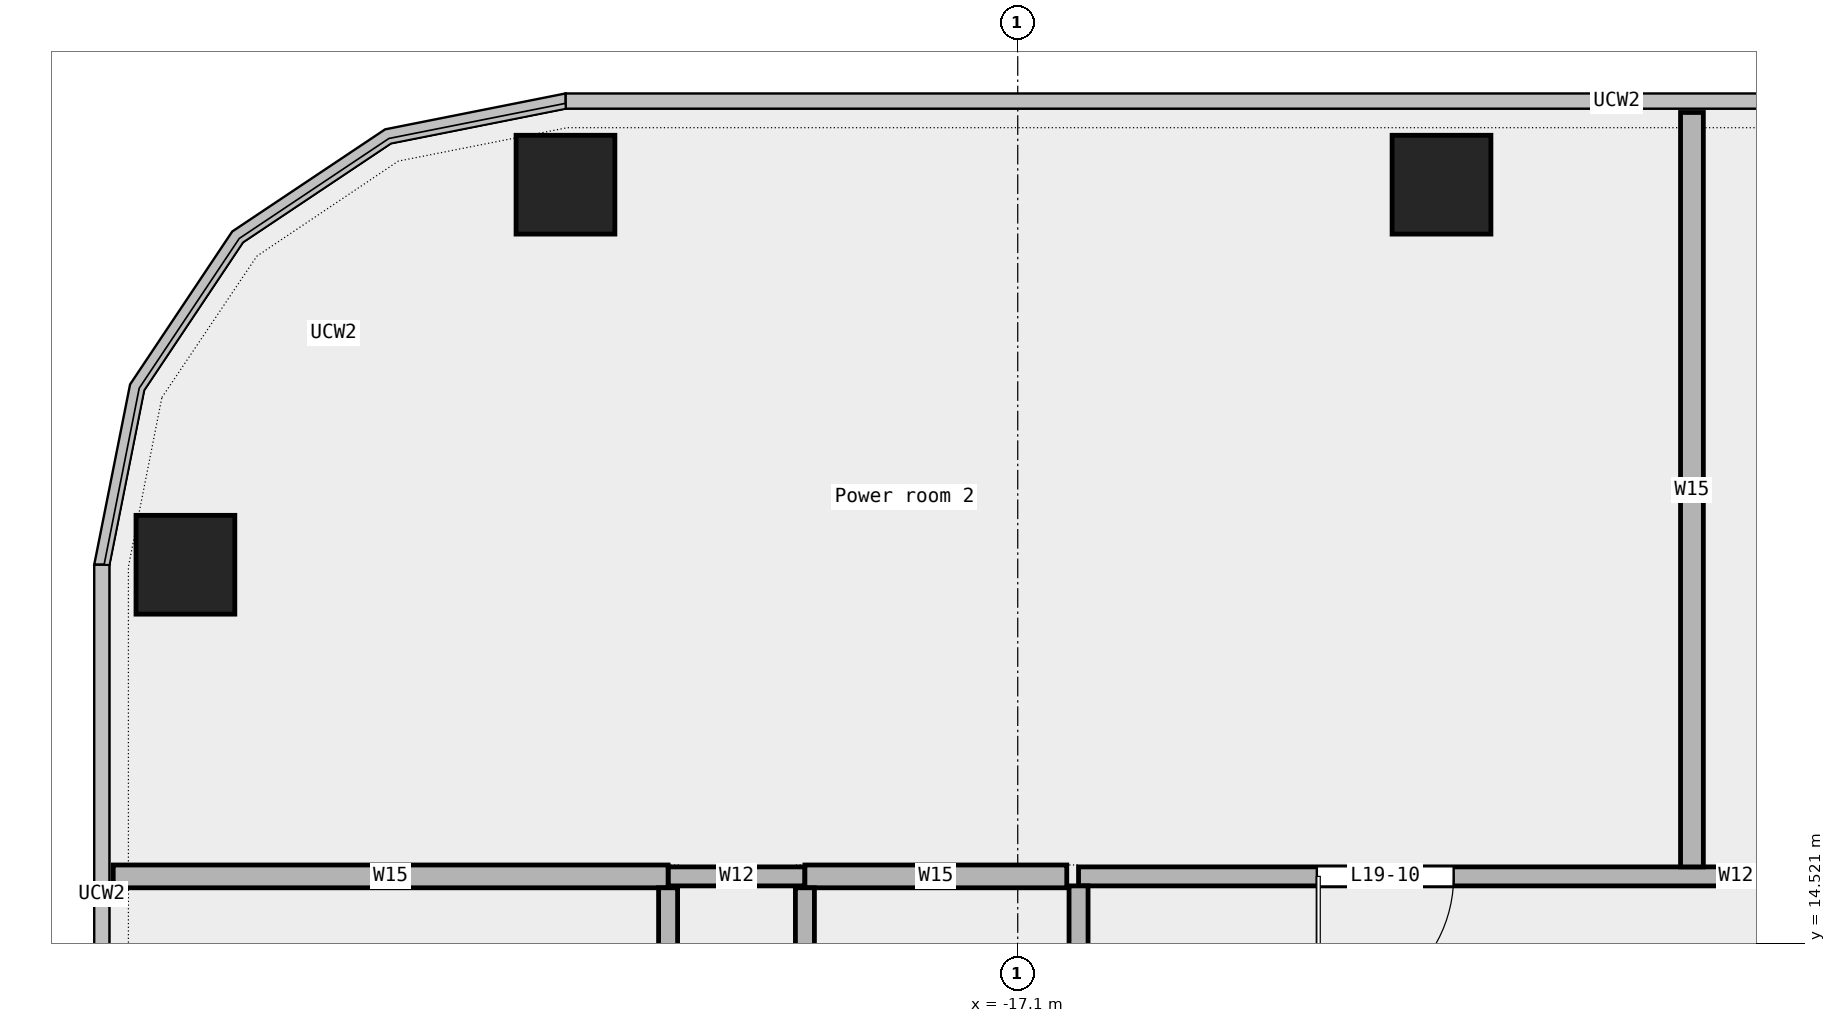
"""IFC4 building model, lengths in metres.
Left out: names, types, materials, properties, quantities, classifications, styles, units other than length and angle.
Written with IfcOpenShell. Run it as: python <this file> out.ifc"""

import sys

from ifc_helpers import new_model, si_unit, direction, frame, frame_2d, origin, origin_2d, place, context, subcontext, project, spatial, rectangle, extrude, element, fill, save


model = new_model("IFC4")
c1 = context("Model", 3, precision=1e-05, world=origin(), true_north=direction((0.0, 1.0)))
c2 = subcontext(c1, "Body", "Model", "MODEL_VIEW")
j1 = project(units=[si_unit("LENGTHUNIT", "METRE"), si_unit("PLANEANGLEUNIT", "RADIAN")], contexts=[c1])
p1 = place(None, origin())
s1 = spatial("IfcSite", under=j1, at=p1, CompositionType="ELEMENT")
p2 = place(p1, origin())
s2 = spatial("IfcBuilding", under=s1, at=p2, CompositionType="ELEMENT")
p3 = place(p2, frame((0.0, 0.0, 99.1)))
s3 = spatial("IfcBuildingStorey", under=s2, at=p3, CompositionType="ELEMENT", Elevation=99.1)
for number, where, z_axis, x_axis in (
    (1, (-11.525, 24.5, 0.0), (0.0, 0.0, 1.0), (1.0, 0.0, 0.0)),
    (2, (-23.05, 24.5, 0.0), (0.0, 0.0, 1.0), (1.0, 0.0, 0.0)),
    (3, (-28.05, 19.5, 0.0), (0.0, 0.0, 1.0), (1.0, 0.0, 0.0)),
):
    element("IfcColumn", number, at=place(p3, frame(where, z_axis=z_axis, x_axis=x_axis)), inside=s3, PredefinedType="COLUMN", context=c2, shape_type="SweptSolid", body=[
        extrude(rectangle(XDim=1.3, YDim=1.3, at=origin_2d()), origin(), (0.0, 0.0, 1.0), 4.05),
    ])
p4 = place(p3, frame((-21.7, 15.4, 0.0), z_axis=(0.0, 0.0, 1.0), x_axis=(1.0, 0.0, 0.0)))
e4 = element("IfcWall", 4, at=p4, inside=s3, PredefinedType="PARTITIONING", context=c2, shape_type="SweptSolid", body=[
    extrude(rectangle(XDim=1.8, YDim=0.25, at=frame_2d((0.9, 0.0))), origin(), (0.0, 0.0, 1.0), 4.05),
])
p5 = place(p3, frame((-16.3, 15.4, 0.0), z_axis=(0.0, 0.0, 1.0), x_axis=(1.0, 0.0, 0.0)))
e5 = element("IfcWall", 5, at=p5, inside=s3, PredefinedType="PARTITIONING", context=c2, shape_type="SweptSolid", body=[
    extrude(rectangle(XDim=17.3, YDim=0.25, at=frame_2d((8.65, 0.0))), origin(), (0.0, 0.0, 1.0), 4.05),
])
p6 = place(p5, frame((12.085, 0.0, 0.0)))
e6 = element("IfcOpeningElement", 6, at=p6, cuts=e5, PredefinedType="OPENING", context=c2, shape_type="SweptSolid", body=[
    extrude(rectangle(XDim=1.2, YDim=2.1, at=frame_2d((0.6, 1.05))), frame((0.0, 0.137, 0.0), z_axis=(0.0, -1.0, 0.0), x_axis=(1.0, 0.0, 0.0)), (0.0, 0.0, 1.0), 0.274),
])
p7 = place(p5, frame((3.135, 0.0, 0.0)))
e7 = element("IfcOpeningElement", 7, at=p7, cuts=e5, PredefinedType="OPENING", context=c2, shape_type="SweptSolid", body=[
    extrude(rectangle(XDim=1.8, YDim=2.1, at=frame_2d((0.9, 1.05))), frame((0.0, 0.137, 0.0), z_axis=(0.0, -1.0, 0.0), x_axis=(1.0, 0.0, 0.0)), (0.0, 0.0, 1.0), 0.274),
])
p8 = place(p3, frame((-29.0, 15.4, 0.0), z_axis=(0.0, 0.0, 1.0), x_axis=(1.0, 0.0, 0.0)))
e8 = element("IfcWall", 8, at=p8, inside=s3, PredefinedType="PARTITIONING", context=c2, shape_type="SweptSolid", body=[
    extrude(rectangle(XDim=7.3, YDim=0.3, at=frame_2d((3.65, 0.0))), origin(), (0.0, 0.0, 1.0), 4.05),
])
p9 = place(p3, frame((-19.9, 15.4, 0.0), z_axis=(0.0, 0.0, 1.0), x_axis=(1.0, 0.0, 0.0)))
e9 = element("IfcWall", 9, at=p9, inside=s3, PredefinedType="PARTITIONING", context=c2, shape_type="SweptSolid", body=[
    extrude(rectangle(XDim=3.445, YDim=0.3, at=frame_2d((1.722, 0.0))), origin(), (0.0, 0.0, 1.0), 4.05),
])
p10 = place(p3, frame((-21.7, 10.96, 0.0), z_axis=(0.0, 0.0, 1.0), x_axis=(0.0, 1.0, 0.0)))
e10 = element("IfcWall", 10, at=p10, inside=s3, PredefinedType="PARTITIONING", context=c2, shape_type="SweptSolid", body=[
    extrude(rectangle(XDim=4.29, YDim=0.25, at=frame_2d((2.145, 0.0))), origin(), (0.0, 0.0, 1.0), 4.05),
])
p11 = place(p10, frame((1.545, 0.0, 0.0)))
e11 = element("IfcOpeningElement", 11, at=p11, cuts=e10, PredefinedType="OPENING", context=c2, shape_type="SweptSolid", body=[
    extrude(rectangle(XDim=1.2, YDim=2.1, at=frame_2d((0.6, 1.05))), frame((0.0, 0.137, 0.0), z_axis=(0.0, -1.0, 0.0), x_axis=(1.0, 0.0, 0.0)), (0.0, 0.0, 1.0), 0.274),
])
p12 = place(p3, frame((-19.9, 9.21, 0.0), z_axis=(0.0, 0.0, 1.0), x_axis=(0.0, 1.0, 0.0)))
e12 = element("IfcWall", 12, at=p12, inside=s3, PredefinedType="PARTITIONING", context=c2, shape_type="SweptSolid", body=[
    extrude(rectangle(XDim=6.04, YDim=0.25, at=frame_2d((3.02, 0.0))), origin(), (0.0, 0.0, 1.0), 4.05),
])
p13 = place(p3, frame((-16.3, 11.75, 0.0), z_axis=(0.0, 0.0, 1.0), x_axis=(0.0, 1.0, 0.0)))
e13 = element("IfcWall", 13, at=p13, inside=s3, PredefinedType="PARTITIONING", context=c2, shape_type="SweptSolid", body=[
    extrude(rectangle(XDim=3.525, YDim=0.25, at=frame_2d((1.762, 0.0))), origin(), (0.0, 0.0, 1.0), 4.05),
])
p14 = place(p13, frame((1.312, 0.0, 0.0)))
e14 = element("IfcOpeningElement", 14, at=p14, cuts=e13, PredefinedType="OPENING", context=c2, shape_type="SweptSolid", body=[
    extrude(rectangle(XDim=0.9, YDim=2.1, at=frame_2d((0.45, 1.05))), frame((0.0, 0.137, 0.0), z_axis=(0.0, -1.0, 0.0), x_axis=(1.0, 0.0, 0.0)), (0.0, 0.0, 1.0), 0.274),
])
p15 = place(p3, frame((-8.23, 15.525, 0.0), z_axis=(0.0, 0.0, 1.0), x_axis=(0.0, 1.0, 0.0)))
e15 = element("IfcWall", 15, at=p15, inside=s3, PredefinedType="PARTITIONING", context=c2, shape_type="SweptSolid", body=[
    extrude(rectangle(XDim=9.925, YDim=0.3, at=frame_2d((4.962, 0.0))), origin(), (0.0, 0.0, 1.0), 4.05),
])
p16 = place(p7, origin())
e16 = element("IfcDoor", 16, at=p16, inside=s3, OperationType="DOUBLE_DOOR_SINGLE_SWING", PredefinedType="DOOR", context=c2, shape_type="SweptSolid", body=[
    extrude(rectangle(XDim=1.8, YDim=2.1, at=frame_2d((0.9, 1.05))), frame((0.0, 0.025, 0.0), z_axis=(0.0, -1.0, 0.0), x_axis=(1.0, 0.0, 0.0)), (0.0, 0.0, 1.0), 0.05),
])
fill(e7, e16)
save(model, sys.argv[1])
